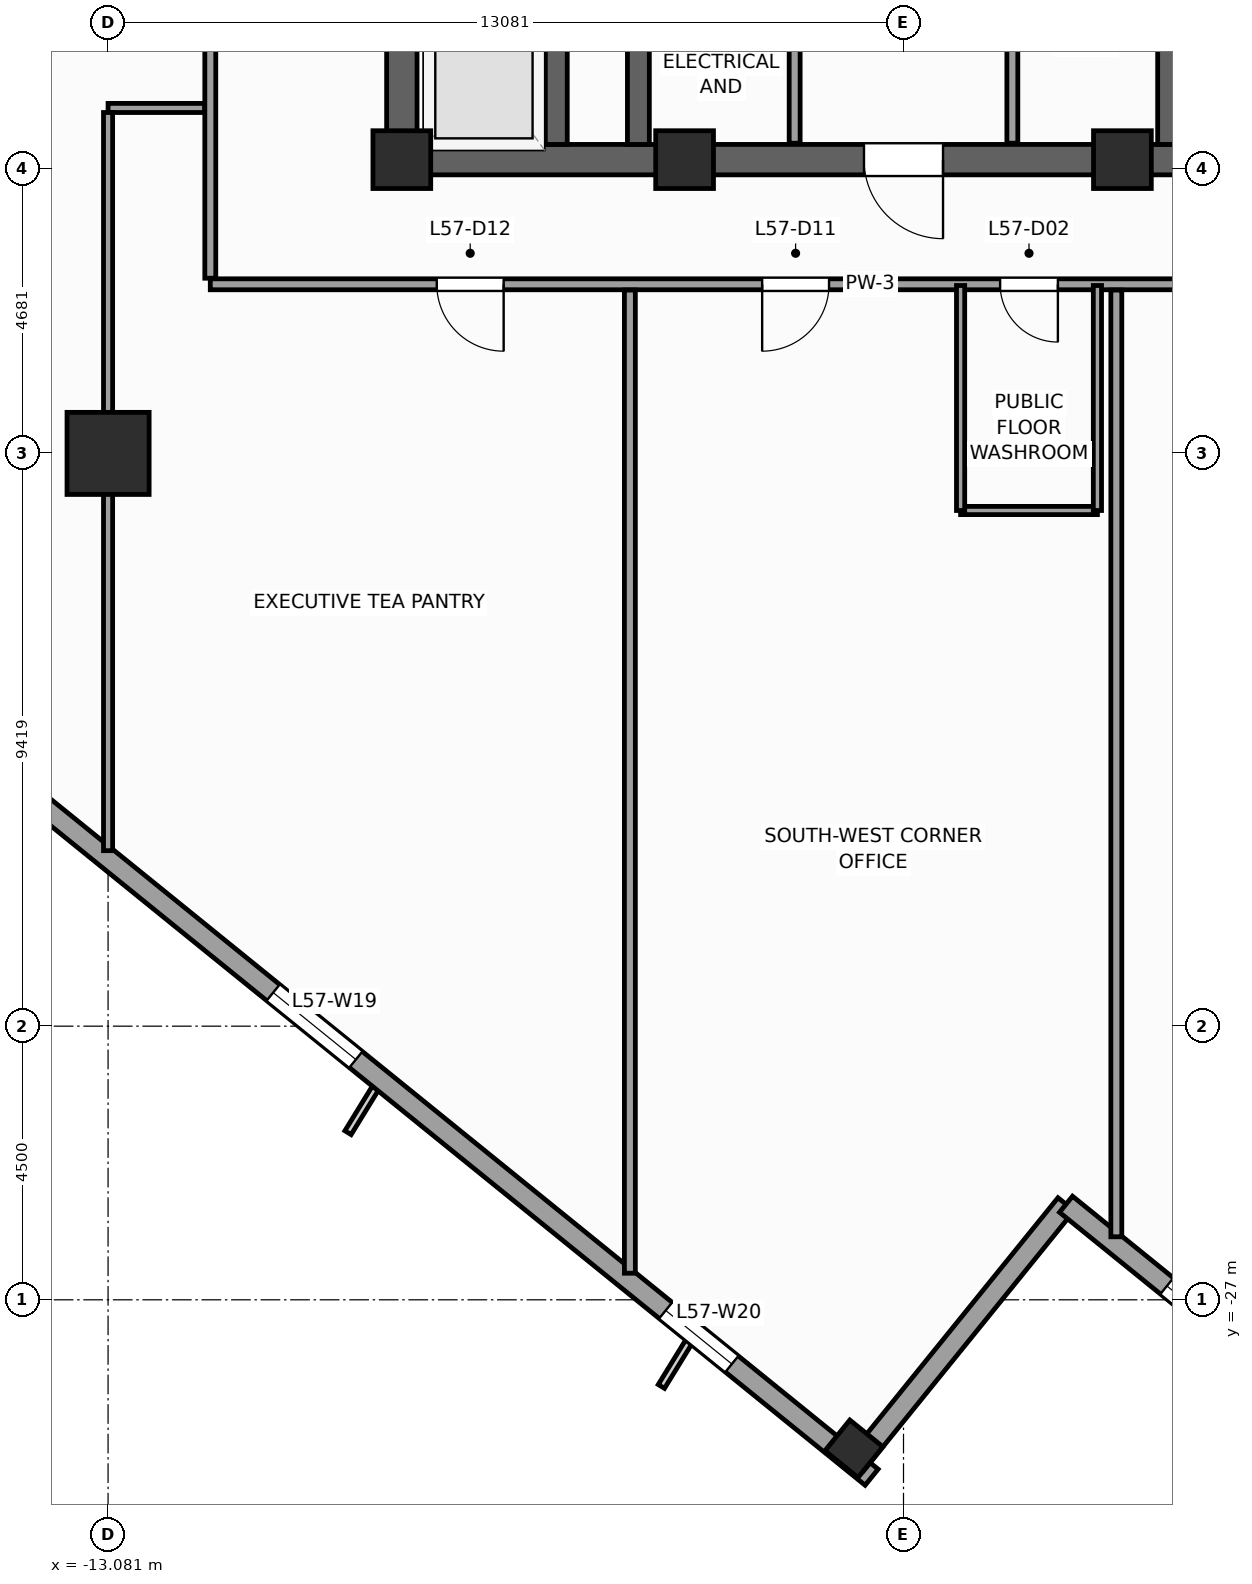
"""IFC4 building model, lengths in metres.
Left out: names, types, materials, properties, quantities, classifications, styles, units other than length and angle.
Written with IfcOpenShell. Run it as: python <this file> out.ifc"""

import sys

from ifc_helpers import new_model, si_unit, direction, frame, frame_2d, origin, origin_2d, place, context, subcontext, project, spatial, rectangle, extrude, source, transform, mapped, element, fill, save


model = new_model("IFC4")
c1 = context("Model", 3, precision=1e-05, world=origin(), true_north=direction((0.0, 1.0)))
c2 = subcontext(c1, "Body", "Model", "MODEL_VIEW")
j1 = project(units=[si_unit("LENGTHUNIT", "METRE"), si_unit("PLANEANGLEUNIT", "RADIAN")], contexts=[c1])
p1 = place(None, origin())
s1 = spatial("IfcSite", under=j1, at=p1, CompositionType="ELEMENT")
p2 = place(p1, origin())
s2 = spatial("IfcBuilding", under=s1, at=p2, CompositionType="ELEMENT")
p3 = place(p2, frame((0.0, 0.0, 236.8)))
s3 = spatial("IfcBuildingStorey", under=s2, at=p3, CompositionType="ELEMENT", Elevation=236.8)
p4 = place(p3, frame((-8.5, -8.25, 0.0), z_axis=(0.0, 0.0, 1.0), x_axis=(1.0, 0.0, 0.0)))
e1 = element("IfcWall", 1, at=p4, inside=s3, PredefinedType="SHEAR", context=c2, shape_type="SweptSolid", body=[
    extrude(rectangle(XDim=17.0, YDim=0.5, at=frame_2d((8.5, 0.0))), origin(), (0.0, 0.0, 1.0), 3.9),
])
p5 = place(p4, frame((7.85, 0.0, 0.0)))
e2 = element("IfcOpeningElement", 2, at=p5, cuts=e1, PredefinedType="OPENING", context=c2, shape_type="SweptSolid", body=[
    extrude(rectangle(XDim=1.3, YDim=2.2, at=frame_2d((0.65, 1.1))), frame((0.0, 0.26, 0.0), z_axis=(0.0, -1.0, 0.0), x_axis=(1.0, 0.0, 0.0)), (0.0, 0.0, 1.0), 0.52),
])
p6 = place(p3, frame((-8.25, -8.0, 0.0), z_axis=(0.0, 0.0, 1.0), x_axis=(0.0, 1.0, 0.0)))
e3 = element("IfcWall", 3, at=p6, inside=s3, PredefinedType="SHEAR", context=c2, shape_type="SweptSolid", body=[
    extrude(rectangle(XDim=16.0, YDim=0.5, at=frame_2d((8.0, 0.0))), origin(), (0.0, 0.0, 1.0), 3.9),
])
p7 = place(p6, frame((4.69, 0.0, 0.0)))
e4 = element("IfcOpeningElement", 4, at=p7, cuts=e3, PredefinedType="OPENING", context=c2, shape_type="SweptSolid", body=[
    extrude(rectangle(XDim=1.3, YDim=2.2, at=frame_2d((0.65, 1.1))), frame((0.0, 0.26, 0.0), z_axis=(0.0, -1.0, 0.0), x_axis=(1.0, 0.0, 0.0)), (0.0, 0.0, 1.0), 0.52),
])
for number, where, z_axis, x_axis in (
    (5, (-4.36, -8.0, 0.0), (0.0, 0.0, 1.0), (0.0, 1.0, 0.0)),
    (6, (4.36, -8.0, 0.0), (0.0, 0.0, 1.0), (0.0, 1.0, 0.0)),
):
    element("IfcWall", number, at=place(p3, frame(where, z_axis=z_axis, x_axis=x_axis)), inside=s3, PredefinedType="SHEAR", context=c2, shape_type="SweptSolid", body=[
        extrude(rectangle(XDim=16.0, YDim=0.36, at=frame_2d((8.0, 0.0))), origin(), (0.0, 0.0, 1.0), 3.9),
    ])
p8 = place(p3, frame((-5.71, -8.0, 0.0), z_axis=(0.0, 0.0, 1.0), x_axis=(0.0, 1.0, 0.0)))
e7 = element("IfcWall", 7, at=p8, inside=s3, PredefinedType="SHEAR", context=c2, shape_type="SweptSolid", body=[
    extrude(rectangle(XDim=2.54, YDim=0.36, at=frame_2d((1.27, 0.0))), origin(), (0.0, 0.0, 1.0), 3.9),
])
m1 = source(origin(), c2, "Body", "SweptSolid", [
    extrude(rectangle(XDim=0.95, YDim=0.95, at=origin_2d()), origin(), (0.0, 0.0, 1.0), 3.9),
])
for number, where, z_axis, x_axis in (
    (8, (-8.25, -8.25, 0.0), (0.0, 0.0, 1.0), (1.0, 0.0, 0.0)),
    (9, (-3.6, -8.25, 0.0), (0.0, 0.0, 1.0), (1.0, 0.0, 0.0)),
    (10, (3.6, -8.25, 0.0), (0.0, 0.0, 1.0), (1.0, 0.0, 0.0)),
):
    element("IfcColumn", number, at=place(p3, frame(where, z_axis=z_axis, x_axis=x_axis)), inside=s3, PredefinedType="PILASTER", context=c2, shape_type="MappedRepresentation", body=[
        mapped(m1, transform((0.0, 0.0, 0.0), scale=1.0)),
    ])
m2 = source(origin(), c2, "Body", "SweptSolid", [
    extrude(rectangle(XDim=1.35, YDim=1.35, at=origin_2d()), origin(), (0.0, 0.0, 1.0), 3.9),
])
p9 = place(p3, frame((-13.081, -13.081, 0.0), z_axis=(0.0, 0.0, 1.0), x_axis=(1.0, 0.0, 0.0)))
e11 = element("IfcColumn", 11, at=p9, inside=s3, PredefinedType="COLUMN", context=c2, shape_type="MappedRepresentation", body=[
    mapped(m2, transform((0.0, 0.0, 0.0), scale=1.0)),
])
m3 = source(origin(), c2, "Body", "SweptSolid", [
    extrude(rectangle(XDim=0.65, YDim=0.7, at=origin_2d()), origin(), (0.0, 0.0, 1.0), 3.9),
])
p10 = place(p3, frame((-0.815, -29.45, 0.0), z_axis=(0.0, 0.0, 1.0), x_axis=(0.62932039105, 0.777145961457, 0.0)))
e12 = element("IfcColumn", 12, at=p10, inside=s3, PredefinedType="COLUMN", context=c2, shape_type="MappedRepresentation", body=[
    mapped(m3, transform((0.0, 0.0, 0.0), scale=1.0)),
])
p11 = place(p3, frame((-29.154, -6.733, 0.0), z_axis=(0.0, 0.0, 1.0), x_axis=(0.77714192302, -0.629325378072, 0.0)))
e13 = element("IfcWall", 13, at=p11, inside=s3, PredefinedType="STANDARD", context=c2, shape_type="SweptSolid", body=[
    extrude(rectangle(XDim=36.84, YDim=0.34, at=frame_2d((18.42, 0.0))), origin(), (0.0, 0.0, 1.0), 2.96),
])
p12 = place(p11, frame((3.721, 0.0, 0.48)))
e14 = element("IfcOpeningElement", 14, at=p12, cuts=e13, PredefinedType="OPENING", context=c2, shape_type="SweptSolid", body=[
    extrude(rectangle(XDim=1.4, YDim=2.4, at=frame_2d((0.7, 1.2))), frame((0.0, 0.18, 0.0), z_axis=(0.0, -1.0, 0.0), x_axis=(1.0, 0.0, 0.0)), (0.0, 0.0, 1.0), 0.36),
])
p13 = place(p11, frame((9.809, 0.0, 0.58)))
e15 = element("IfcOpeningElement", 15, at=p13, cuts=e13, PredefinedType="OPENING", context=c2, shape_type="SweptSolid", body=[
    extrude(rectangle(XDim=1.75, YDim=2.3, at=frame_2d((0.875, 1.15))), frame((0.0, 0.18, 0.0), z_axis=(0.0, -1.0, 0.0), x_axis=(1.0, 0.0, 0.0)), (0.0, 0.0, 1.0), 0.36),
])
p14 = place(p11, frame((16.058, 0.0, 0.58)))
e16 = element("IfcOpeningElement", 16, at=p14, cuts=e13, PredefinedType="OPENING", context=c2, shape_type="SweptSolid", body=[
    extrude(rectangle(XDim=1.75, YDim=2.3, at=frame_2d((0.875, 1.15))), frame((0.0, 0.18, 0.0), z_axis=(0.0, -1.0, 0.0), x_axis=(1.0, 0.0, 0.0)), (0.0, 0.0, 1.0), 0.36),
])
p15 = place(p11, frame((24.176, 0.0, 0.58)))
e17 = element("IfcOpeningElement", 17, at=p15, cuts=e13, PredefinedType="OPENING", context=c2, shape_type="SweptSolid", body=[
    extrude(rectangle(XDim=1.75, YDim=2.3, at=frame_2d((0.875, 1.15))), frame((0.0, 0.18, 0.0), z_axis=(0.0, -1.0, 0.0), x_axis=(1.0, 0.0, 0.0)), (0.0, 0.0, 1.0), 0.36),
])
p16 = place(p11, frame((32.482, 0.0, 0.48)))
e18 = element("IfcOpeningElement", 18, at=p16, cuts=e13, PredefinedType="OPENING", context=c2, shape_type="SweptSolid", body=[
    extrude(rectangle(XDim=1.4, YDim=2.4, at=frame_2d((0.7, 1.2))), frame((0.0, 0.18, 0.0), z_axis=(0.0, -1.0, 0.0), x_axis=(1.0, 0.0, 0.0)), (0.0, 0.0, 1.0), 0.36),
])
p17 = place(p3, frame((-0.789, -29.703, 0.0), z_axis=(0.0, 0.0, 1.0), x_axis=(0.629323365087, 0.77714355312, 0.0)))
e19 = element("IfcWall", 19, at=p17, inside=s3, PredefinedType="STANDARD", context=c2, shape_type="SweptSolid", body=[
    extrude(rectangle(XDim=5.5, YDim=0.34, at=frame_2d((2.75, 0.0))), origin(), (0.0, 0.0, 1.0), 3.66),
])
p18 = place(p3, frame((2.673, -25.429, 0.0), z_axis=(0.0, 0.0, 1.0), x_axis=(0.777162640055, -0.629299794138, 0.0)))
e20 = element("IfcWall", 20, at=p18, inside=s3, PredefinedType="STANDARD", context=c2, shape_type="SweptSolid", body=[
    extrude(rectangle(XDim=5.67, YDim=0.34, at=frame_2d((2.835, 0.0))), origin(), (0.0, 0.0, 1.0), 3.66),
])
p19 = place(p18, frame((2.135, 0.0, 0.48)))
e21 = element("IfcOpeningElement", 21, at=p19, cuts=e20, PredefinedType="OPENING", context=c2, shape_type="SweptSolid", body=[
    extrude(rectangle(XDim=1.4, YDim=2.4, at=frame_2d((0.7, 1.2))), frame((0.0, 0.18, 0.0), z_axis=(0.0, -1.0, 0.0), x_axis=(1.0, 0.0, 0.0)), (0.0, 0.0, 1.0), 0.36),
])
p20 = place(p3, frame((-1.79, -7.98, 0.0), z_axis=(0.0, 0.0, 1.0), x_axis=(0.0, 1.0, 0.0)))
e22 = element("IfcWall", 22, at=p20, inside=s3, PredefinedType="PARTITIONING", context=c2, shape_type="SweptSolid", body=[
    extrude(rectangle(XDim=12.38, YDim=0.18, at=frame_2d((6.19, 0.0))), origin(), (0.0, 0.0, 1.0), 3.66),
])
p21 = place(p20, frame((8.8, 0.0, 0.0)))
e23 = element("IfcOpeningElement", 23, at=p21, cuts=e22, PredefinedType="OPENING", context=c2, shape_type="SweptSolid", body=[
    extrude(rectangle(XDim=1.1, YDim=2.2, at=frame_2d((0.55, 1.1))), frame((0.0, 0.1, 0.0), z_axis=(0.0, -1.0, 0.0), x_axis=(1.0, 0.0, 0.0)), (0.0, 0.0, 1.0), 0.2),
])
p22 = place(p20, frame((10.86, 0.0, 0.0)))
e24 = element("IfcOpeningElement", 24, at=p22, cuts=e22, PredefinedType="OPENING", context=c2, shape_type="SweptSolid", body=[
    extrude(rectangle(XDim=1.1, YDim=2.2, at=frame_2d((0.55, 1.1))), frame((0.0, 0.1, 0.0), z_axis=(0.0, -1.0, 0.0), x_axis=(1.0, 0.0, 0.0)), (0.0, 0.0, 1.0), 0.2),
])
p23 = place(p20, frame((3.5, 0.0, 0.0)))
e25 = element("IfcOpeningElement", 25, at=p23, cuts=e22, PredefinedType="OPENING", context=c2, shape_type="SweptSolid", body=[
    extrude(rectangle(XDim=1.15, YDim=2.25, at=frame_2d((0.575, 1.125))), frame((0.0, 0.1, 0.0), z_axis=(0.0, -1.0, 0.0), x_axis=(1.0, 0.0, 0.0)), (0.0, 0.0, 1.0), 0.2),
])
p24 = place(p3, frame((1.79, -7.98, 0.0), z_axis=(0.0, 0.0, 1.0), x_axis=(0.0, 1.0, 0.0)))
e26 = element("IfcWall", 26, at=p24, inside=s3, PredefinedType="PARTITIONING", context=c2, shape_type="SweptSolid", body=[
    extrude(rectangle(XDim=12.38, YDim=0.18, at=frame_2d((6.19, 0.0))), origin(), (0.0, 0.0, 1.0), 3.66),
])
p25 = place(p24, frame((8.8, 0.0, 0.0)))
e27 = element("IfcOpeningElement", 27, at=p25, cuts=e26, PredefinedType="OPENING", context=c2, shape_type="SweptSolid", body=[
    extrude(rectangle(XDim=1.1, YDim=2.2, at=frame_2d((0.55, 1.1))), frame((0.0, 0.1, 0.0), z_axis=(0.0, -1.0, 0.0), x_axis=(1.0, 0.0, 0.0)), (0.0, 0.0, 1.0), 0.2),
])
p26 = place(p24, frame((10.86, 0.0, 0.0)))
e28 = element("IfcOpeningElement", 28, at=p26, cuts=e26, PredefinedType="OPENING", context=c2, shape_type="SweptSolid", body=[
    extrude(rectangle(XDim=1.1, YDim=2.2, at=frame_2d((0.55, 1.1))), frame((0.0, 0.1, 0.0), z_axis=(0.0, -1.0, 0.0), x_axis=(1.0, 0.0, 0.0)), (0.0, 0.0, 1.0), 0.2),
])
p27 = place(p24, frame((3.5, 0.0, 0.0)))
e29 = element("IfcOpeningElement", 29, at=p27, cuts=e26, PredefinedType="OPENING", context=c2, shape_type="SweptSolid", body=[
    extrude(rectangle(XDim=1.15, YDim=2.25, at=frame_2d((0.575, 1.125))), frame((0.0, 0.1, 0.0), z_axis=(0.0, -1.0, 0.0), x_axis=(1.0, 0.0, 0.0)), (0.0, 0.0, 1.0), 0.2),
])
p28 = place(p3, frame((-11.4, -10.3, 0.0), z_axis=(0.0, 0.0, 1.0), x_axis=(1.0, 0.0, 0.0)))
e30 = element("IfcWall", 30, at=p28, inside=s3, PredefinedType="PARTITIONING", context=c2, shape_type="SweptSolid", body=[
    extrude(rectangle(XDim=21.7, YDim=0.18, at=frame_2d((10.85, 0.0))), origin(), (0.0, 0.0, 1.0), 3.66),
])
p29 = place(p28, frame((12.989, 0.0, 0.0)))
e31 = element("IfcOpeningElement", 31, at=p29, cuts=e30, PredefinedType="OPENING", context=c2, shape_type="SweptSolid", body=[
    extrude(rectangle(XDim=0.95, YDim=2.1, at=frame_2d((0.475, 1.05))), frame((0.0, 0.1, 0.0), z_axis=(0.0, -1.0, 0.0), x_axis=(1.0, 0.0, 0.0)), (0.0, 0.0, 1.0), 0.2),
])
p30 = place(p28, frame((17.585, 0.0, 0.0)))
e32 = element("IfcOpeningElement", 32, at=p30, cuts=e30, PredefinedType="OPENING", context=c2, shape_type="SweptSolid", body=[
    extrude(rectangle(XDim=1.1, YDim=2.2, at=frame_2d((0.55, 1.1))), frame((0.0, 0.1, 0.0), z_axis=(0.0, -1.0, 0.0), x_axis=(1.0, 0.0, 0.0)), (0.0, 0.0, 1.0), 0.2),
])
p31 = place(p28, frame((9.075, 0.0, 0.0)))
e33 = element("IfcOpeningElement", 33, at=p31, cuts=e30, PredefinedType="OPENING", context=c2, shape_type="SweptSolid", body=[
    extrude(rectangle(XDim=1.1, YDim=2.2, at=frame_2d((0.55, 1.1))), frame((0.0, 0.1, 0.0), z_axis=(0.0, -1.0, 0.0), x_axis=(1.0, 0.0, 0.0)), (0.0, 0.0, 1.0), 0.2),
])
p32 = place(p28, frame((3.724, 0.0, 0.0)))
e34 = element("IfcOpeningElement", 34, at=p32, cuts=e30, PredefinedType="OPENING", context=c2, shape_type="SweptSolid", body=[
    extrude(rectangle(XDim=1.1, YDim=2.2, at=frame_2d((0.55, 1.1))), frame((0.0, 0.1, 0.0), z_axis=(0.0, -1.0, 0.0), x_axis=(1.0, 0.0, 0.0)), (0.0, 0.0, 1.0), 0.2),
])
p33 = place(p3, frame((-11.4, -10.2, 0.0), z_axis=(0.0, 0.0, 1.0), x_axis=(0.0, 1.0, 0.0)))
e35 = element("IfcWall", 35, at=p33, inside=s3, PredefinedType="PARTITIONING", context=c2, shape_type="SweptSolid", body=[
    extrude(rectangle(XDim=20.4, YDim=0.18, at=frame_2d((10.2, 0.0))), origin(), (0.0, 0.0, 1.0), 3.66),
])
p34 = place(p33, frame((14.85, 0.0, 0.0)))
e36 = element("IfcOpeningElement", 36, at=p34, cuts=e35, PredefinedType="OPENING", context=c2, shape_type="SweptSolid", body=[
    extrude(rectangle(XDim=1.1, YDim=2.2, at=frame_2d((0.55, 1.1))), frame((0.0, 0.1, 0.0), z_axis=(0.0, -1.0, 0.0), x_axis=(1.0, 0.0, 0.0)), (0.0, 0.0, 1.0), 0.2),
])
p35 = place(p33, frame((4.7, 0.0, 0.0)))
e37 = element("IfcOpeningElement", 37, at=p35, cuts=e35, PredefinedType="OPENING", context=c2, shape_type="SweptSolid", body=[
    extrude(rectangle(XDim=1.1, YDim=2.2, at=frame_2d((0.55, 1.1))), frame((0.0, 0.1, 0.0), z_axis=(0.0, -1.0, 0.0), x_axis=(1.0, 0.0, 0.0)), (0.0, 0.0, 1.0), 0.2),
])
p36 = place(p33, frame((9.9, 0.0, 0.0)))
e38 = element("IfcOpeningElement", 38, at=p36, cuts=e35, PredefinedType="OPENING", context=c2, shape_type="SweptSolid", body=[
    extrude(rectangle(XDim=1.1, YDim=2.2, at=frame_2d((0.55, 1.1))), frame((0.0, 0.1, 0.0), z_axis=(0.0, -1.0, 0.0), x_axis=(1.0, 0.0, 0.0)), (0.0, 0.0, 1.0), 0.2),
])
p37 = place(p3, frame((3.5, -10.395, 0.0), z_axis=(0.0, 0.0, 1.0), x_axis=(0.0, -1.0, 0.0)))
e39 = element("IfcWall", 39, at=p37, inside=s3, PredefinedType="PARTITIONING", context=c2, shape_type="SweptSolid", body=[
    extrude(rectangle(XDim=15.569, YDim=0.18, at=frame_2d((7.784, 0.0))), origin(), (0.0, 0.0, 1.0), 3.66),
])
p38 = place(p3, frame((-4.5, -10.395, 0.0), z_axis=(0.0, 0.0, 1.0), x_axis=(0.0, -1.0, 0.0)))
e40 = element("IfcWall", 40, at=p38, inside=s3, PredefinedType="PARTITIONING", context=c2, shape_type="SweptSolid", body=[
    extrude(rectangle(XDim=16.168, YDim=0.18, at=frame_2d((8.084, 0.0))), origin(), (0.0, 0.0, 1.0), 3.66),
])
p39 = place(p3, frame((-11.495, -7.4, 0.0), z_axis=(0.0, 0.0, 1.0), x_axis=(-1.0, 0.0, 0.0)))
e41 = element("IfcWall", 41, at=p39, inside=s3, PredefinedType="PARTITIONING", context=c2, shape_type="SweptSolid", body=[
    extrude(rectangle(XDim=1.586, YDim=0.15, at=frame_2d((0.793, 0.0))), origin(), (0.0, 0.0, 1.0), 3.66),
])
p40 = place(p3, frame((-13.081, -7.475, 0.0), z_axis=(0.0, 0.0, 1.0), x_axis=(0.0, -1.0, 0.0)))
e42 = element("IfcWall", 42, at=p40, inside=s3, PredefinedType="PARTITIONING", context=c2, shape_type="SweptSolid", body=[
    extrude(rectangle(XDim=12.139, YDim=0.15, at=frame_2d((6.069, 0.0))), origin(), (0.0, 0.0, 1.0), 2.76),
])
p41 = place(p3, frame((0.939, -14.02, 0.0), z_axis=(0.0, 0.0, 1.0), x_axis=(1.0, 0.0, 0.0)))
e43 = element("IfcWall", 43, at=p41, inside=s3, PredefinedType="PARTITIONING", context=c2, shape_type="SweptSolid", body=[
    extrude(rectangle(XDim=2.25, YDim=0.135, at=frame_2d((1.125, 0.0))), origin(), (0.0, 0.0, 1.0), 3.66),
])
for number, where, z_axis, x_axis in (
    (44, (3.189, -14.02, 0.0), (0.0, 0.0, 1.0), (0.0, 1.0, 0.0)),
    (45, (0.939, -14.02, 0.0), (0.0, 0.0, 1.0), (0.0, 1.0, 0.0)),
):
    element("IfcWall", number, at=place(p3, frame(where, z_axis=z_axis, x_axis=x_axis)), inside=s3, PredefinedType="PARTITIONING", context=c2, shape_type="SweptSolid", body=[
        extrude(rectangle(XDim=3.7, YDim=0.135, at=frame_2d((1.85, 0.0))), origin(), (0.0, 0.0, 1.0), 3.66),
    ])
m4 = source(origin(), c2, "Body", "SweptSolid", [
    extrude(rectangle(XDim=1.75, YDim=2.3, at=frame_2d((0.875, 1.15))), frame((0.0, 0.03, 0.0), z_axis=(0.0, -1.0, 0.0), x_axis=(1.0, 0.0, 0.0)), (0.0, 0.0, 1.0), 0.06),
])
p42 = place(p15, origin())
e46 = element("IfcWindow", 46, at=p42, inside=s3, PartitioningType="SINGLE_PANEL", PredefinedType="WINDOW", context=c2, shape_type="MappedRepresentation", body=[
    mapped(m4, transform((0.0, 0.0, 0.0), scale=1.0)),
])
fill(e17, e46)
m5 = source(origin(), c2, "Body", "SweptSolid", [
    extrude(rectangle(XDim=1.4, YDim=2.4, at=frame_2d((0.7, 1.2))), frame((0.0, 0.03, 0.0), z_axis=(0.0, -1.0, 0.0), x_axis=(1.0, 0.0, 0.0)), (0.0, 0.0, 1.0), 0.06),
])
p43 = place(p16, origin())
e47 = element("IfcWindow", 47, at=p43, inside=s3, PartitioningType="SINGLE_PANEL", PredefinedType="WINDOW", context=c2, shape_type="MappedRepresentation", body=[
    mapped(m5, transform((0.0, 0.0, 0.0), scale=1.0)),
])
fill(e18, e47)
p44 = place(p19, origin())
e48 = element("IfcWindow", 48, at=p44, inside=s3, PartitioningType="SINGLE_PANEL", PredefinedType="WINDOW", context=c2, shape_type="MappedRepresentation", body=[
    mapped(m5, transform((0.0, 0.0, 0.0), scale=1.0)),
])
fill(e21, e48)
m6 = source(origin(), c2, "Body", "SweptSolid", [
    extrude(rectangle(XDim=1.3, YDim=2.2, at=frame_2d((0.65, 1.1))), frame((0.0, 0.025, 0.0), z_axis=(0.0, -1.0, 0.0), x_axis=(1.0, 0.0, 0.0)), (0.0, 0.0, 1.0), 0.05),
])
p45 = place(p5, frame((1.3, 0.0, 0.0), z_axis=(0.0, 0.0, 1.0), x_axis=(-1.0, 0.0, 0.0)))
e49 = element("IfcDoor", 49, at=p45, inside=s3, OperationType="SINGLE_SWING_RIGHT", PredefinedType="DOOR", context=c2, shape_type="MappedRepresentation", body=[
    mapped(m6, transform((0.0, 0.0, 0.0), scale=1.0)),
])
fill(e2, e49)
m7 = source(origin(), c2, "Body", "SweptSolid", [
    extrude(rectangle(XDim=0.95, YDim=2.1, at=frame_2d((0.475, 1.05))), frame((0.0, 0.025, 0.0), z_axis=(0.0, -1.0, 0.0), x_axis=(1.0, 0.0, 0.0)), (0.0, 0.0, 1.0), 0.05),
])
p46 = place(p29, frame((0.95, 0.0, 0.0), z_axis=(0.0, 0.0, 1.0), x_axis=(-1.0, 0.0, 0.0)))
e50 = element("IfcDoor", 50, at=p46, inside=s3, OperationType="SINGLE_SWING_RIGHT", PredefinedType="DOOR", context=c2, shape_type="MappedRepresentation", body=[
    mapped(m7, transform((0.0, 0.0, 0.0), scale=1.0)),
])
fill(e31, e50)
m8 = source(origin(), c2, "Body", "SweptSolid", [
    extrude(rectangle(XDim=1.1, YDim=2.2, at=frame_2d((0.55, 1.1))), frame((0.0, 0.025, 0.0), z_axis=(0.0, -1.0, 0.0), x_axis=(1.0, 0.0, 0.0)), (0.0, 0.0, 1.0), 0.05),
])
p47 = place(p31, frame((1.1, 0.0, 0.0), z_axis=(0.0, 0.0, 1.0), x_axis=(-1.0, 0.0, 0.0)))
e51 = element("IfcDoor", 51, at=p47, inside=s3, OperationType="SINGLE_SWING_LEFT", PredefinedType="DOOR", context=c2, shape_type="MappedRepresentation", body=[
    mapped(m8, transform((0.0, 0.0, 0.0), scale=1.0)),
])
fill(e33, e51)
p48 = place(p32, frame((1.1, 0.0, 0.0), z_axis=(0.0, 0.0, 1.0), x_axis=(-1.0, 0.0, 0.0)))
e52 = element("IfcDoor", 52, at=p48, inside=s3, OperationType="SINGLE_SWING_RIGHT", PredefinedType="DOOR", context=c2, shape_type="MappedRepresentation", body=[
    mapped(m8, transform((0.0, 0.0, 0.0), scale=1.0)),
])
fill(e34, e52)
save(model, sys.argv[1])
